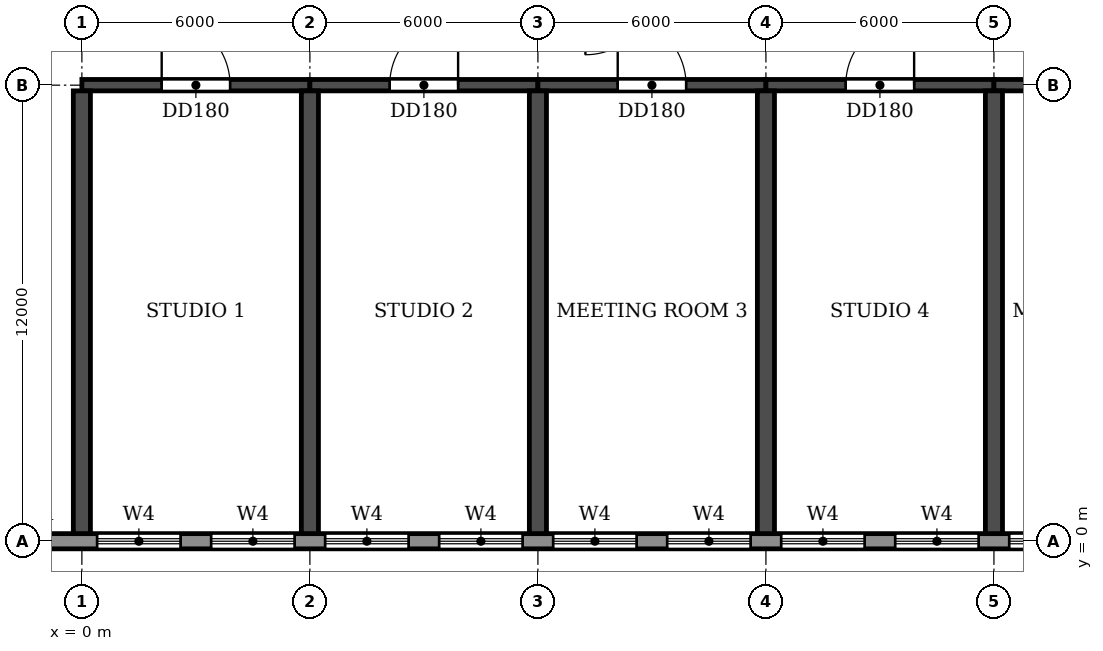
"""IFC4 building model, lengths in metres.
Left out: names, types, materials, properties, quantities, classifications, styles, units other than length and angle.
Written with IfcOpenShell. Run it as: python <this file> out.ifc"""

import sys

from ifc_helpers import new_model, si_unit, direction, frame, frame_2d, origin, place, context, subcontext, project, spatial, rectangle, extrude, element, fill, save


model = new_model("IFC4")
c1 = context("Model", 3, precision=1e-05, world=origin(), true_north=direction((0.0, 1.0)))
c2 = subcontext(c1, "Body", "Model", "MODEL_VIEW")
j1 = project(units=[si_unit("LENGTHUNIT", "METRE"), si_unit("PLANEANGLEUNIT", "RADIAN")], contexts=[c1])
p1 = place(None, origin())
s1 = spatial("IfcSite", under=j1, at=p1, CompositionType="ELEMENT")
p2 = place(p1, origin())
s2 = spatial("IfcBuilding", under=s1, at=p2, CompositionType="ELEMENT")
p3 = place(p2, frame((0.0, 0.0, 19.2)))
s3 = spatial("IfcBuildingStorey", under=s2, at=p3, CompositionType="ELEMENT", Elevation=19.2)
for number, where, z_axis, x_axis in (
    (1, (0.0, 0.2, 0.0), (0.0, 0.0, 1.0), (0.0, 1.0, 0.0)),
    (2, (6.0, 0.2, 0.0), (0.0, 0.0, 1.0), (0.0, 1.0, 0.0)),
    (3, (12.0, 0.2, 0.0), (0.0, 0.0, 1.0), (0.0, 1.0, 0.0)),
    (4, (18.0, 0.2, 0.0), (0.0, 0.0, 1.0), (0.0, 1.0, 0.0)),
    (5, (24.0, 0.2, 0.0), (0.0, 0.0, 1.0), (0.0, 1.0, 0.0)),
):
    element("IfcWall", number, at=place(p3, frame(where, z_axis=z_axis, x_axis=x_axis)), inside=s3, PredefinedType="SHEAR", context=c2, shape_type="SweptSolid", body=[
        extrude(rectangle(XDim=11.65, YDim=0.45, at=frame_2d((5.825, 0.0))), origin(), (0.0, 0.0, 1.0), 3.95),
    ])
p4 = place(p3, frame((0.0, 12.0, 0.0), z_axis=(0.0, 0.0, 1.0), x_axis=(1.0, 0.0, 0.0)))
e6 = element("IfcWall", 6, at=p4, inside=s3, PredefinedType="SHEAR", context=c2, shape_type="SweptSolid", body=[
    extrude(rectangle(XDim=6.0, YDim=0.3, at=frame_2d((3.0, 0.0))), origin(), (0.0, 0.0, 1.0), 3.35),
])
p5 = place(p4, frame((2.1, 0.0, 0.0)))
e7 = element("IfcOpeningElement", 7, at=p5, cuts=e6, PredefinedType="OPENING", context=c2, shape_type="SweptSolid", body=[
    extrude(rectangle(XDim=1.8, YDim=2.1, at=frame_2d((0.9, 1.05))), frame((0.0, 0.16, 0.0), z_axis=(0.0, -1.0, 0.0), x_axis=(1.0, 0.0, 0.0)), (0.0, 0.0, 1.0), 0.32),
])
p6 = place(p3, frame((6.0, 12.0, 0.0), z_axis=(0.0, 0.0, 1.0), x_axis=(1.0, 0.0, 0.0)))
e8 = element("IfcWall", 8, at=p6, inside=s3, PredefinedType="SHEAR", context=c2, shape_type="SweptSolid", body=[
    extrude(rectangle(XDim=6.0, YDim=0.3, at=frame_2d((3.0, 0.0))), origin(), (0.0, 0.0, 1.0), 3.35),
])
p7 = place(p6, frame((2.1, 0.0, 0.0)))
e9 = element("IfcOpeningElement", 9, at=p7, cuts=e8, PredefinedType="OPENING", context=c2, shape_type="SweptSolid", body=[
    extrude(rectangle(XDim=1.8, YDim=2.1, at=frame_2d((0.9, 1.05))), frame((0.0, 0.16, 0.0), z_axis=(0.0, -1.0, 0.0), x_axis=(1.0, 0.0, 0.0)), (0.0, 0.0, 1.0), 0.32),
])
p8 = place(p3, frame((12.0, 12.0, 0.0), z_axis=(0.0, 0.0, 1.0), x_axis=(1.0, 0.0, 0.0)))
e10 = element("IfcWall", 10, at=p8, inside=s3, PredefinedType="SHEAR", context=c2, shape_type="SweptSolid", body=[
    extrude(rectangle(XDim=6.0, YDim=0.3, at=frame_2d((3.0, 0.0))), origin(), (0.0, 0.0, 1.0), 3.35),
])
p9 = place(p8, frame((2.1, 0.0, 0.0)))
e11 = element("IfcOpeningElement", 11, at=p9, cuts=e10, PredefinedType="OPENING", context=c2, shape_type="SweptSolid", body=[
    extrude(rectangle(XDim=1.8, YDim=2.1, at=frame_2d((0.9, 1.05))), frame((0.0, 0.16, 0.0), z_axis=(0.0, -1.0, 0.0), x_axis=(1.0, 0.0, 0.0)), (0.0, 0.0, 1.0), 0.32),
])
p10 = place(p3, frame((18.0, 12.0, 0.0), z_axis=(0.0, 0.0, 1.0), x_axis=(1.0, 0.0, 0.0)))
e12 = element("IfcWall", 12, at=p10, inside=s3, PredefinedType="SHEAR", context=c2, shape_type="SweptSolid", body=[
    extrude(rectangle(XDim=6.0, YDim=0.3, at=frame_2d((3.0, 0.0))), origin(), (0.0, 0.0, 1.0), 3.35),
])
p11 = place(p10, frame((2.1, 0.0, 0.0)))
e13 = element("IfcOpeningElement", 13, at=p11, cuts=e12, PredefinedType="OPENING", context=c2, shape_type="SweptSolid", body=[
    extrude(rectangle(XDim=1.8, YDim=2.1, at=frame_2d((0.9, 1.05))), frame((0.0, 0.16, 0.0), z_axis=(0.0, -1.0, 0.0), x_axis=(1.0, 0.0, 0.0)), (0.0, 0.0, 1.0), 0.32),
])
p12 = place(p3, frame((24.0, 12.0, 0.0), z_axis=(0.0, 0.0, 1.0), x_axis=(1.0, 0.0, 0.0)))
e14 = element("IfcWall", 14, at=p12, inside=s3, PredefinedType="SHEAR", context=c2, shape_type="SweptSolid", body=[
    extrude(rectangle(XDim=6.0, YDim=0.3, at=frame_2d((3.0, 0.0))), origin(), (0.0, 0.0, 1.0), 3.35),
])
p13 = place(p12, frame((2.1, 0.0, 0.0)))
e15 = element("IfcOpeningElement", 15, at=p13, cuts=e14, PredefinedType="OPENING", context=c2, shape_type="SweptSolid", body=[
    extrude(rectangle(XDim=1.8, YDim=2.1, at=frame_2d((0.9, 1.05))), frame((0.0, 0.16, 0.0), z_axis=(0.0, -1.0, 0.0), x_axis=(1.0, 0.0, 0.0)), (0.0, 0.0, 1.0), 0.32),
])
p14 = place(p3, frame((-3.0, 0.0, 0.0), z_axis=(0.0, 0.0, 1.0), x_axis=(1.0, 0.0, 0.0)))
e16 = element("IfcWall", 16, at=p14, inside=s3, PredefinedType="STANDARD", context=c2, shape_type="SweptSolid", body=[
    extrude(rectangle(XDim=108.0, YDim=0.4, at=frame_2d((54.0, 0.0))), origin(), (0.0, 0.0, 1.0), 3.95),
])
p15 = place(p14, frame((3.4, 0.0, 0.9)))
e17 = element("IfcOpeningElement", 17, at=p15, cuts=e16, PredefinedType="OPENING", context=c2, shape_type="SweptSolid", body=[
    extrude(rectangle(XDim=2.2, YDim=2.7, at=frame_2d((1.1, 1.35))), frame((0.0, 0.21, 0.0), z_axis=(0.0, -1.0, 0.0), x_axis=(1.0, 0.0, 0.0)), (0.0, 0.0, 1.0), 0.42),
])
p16 = place(p14, frame((6.4, 0.0, 0.9)))
e18 = element("IfcOpeningElement", 18, at=p16, cuts=e16, PredefinedType="OPENING", context=c2, shape_type="SweptSolid", body=[
    extrude(rectangle(XDim=2.2, YDim=2.7, at=frame_2d((1.1, 1.35))), frame((0.0, 0.21, 0.0), z_axis=(0.0, -1.0, 0.0), x_axis=(1.0, 0.0, 0.0)), (0.0, 0.0, 1.0), 0.42),
])
p17 = place(p14, frame((9.4, 0.0, 0.9)))
e19 = element("IfcOpeningElement", 19, at=p17, cuts=e16, PredefinedType="OPENING", context=c2, shape_type="SweptSolid", body=[
    extrude(rectangle(XDim=2.2, YDim=2.7, at=frame_2d((1.1, 1.35))), frame((0.0, 0.21, 0.0), z_axis=(0.0, -1.0, 0.0), x_axis=(1.0, 0.0, 0.0)), (0.0, 0.0, 1.0), 0.42),
])
p18 = place(p14, frame((12.4, 0.0, 0.9)))
e20 = element("IfcOpeningElement", 20, at=p18, cuts=e16, PredefinedType="OPENING", context=c2, shape_type="SweptSolid", body=[
    extrude(rectangle(XDim=2.2, YDim=2.7, at=frame_2d((1.1, 1.35))), frame((0.0, 0.21, 0.0), z_axis=(0.0, -1.0, 0.0), x_axis=(1.0, 0.0, 0.0)), (0.0, 0.0, 1.0), 0.42),
])
p19 = place(p14, frame((15.4, 0.0, 0.9)))
e21 = element("IfcOpeningElement", 21, at=p19, cuts=e16, PredefinedType="OPENING", context=c2, shape_type="SweptSolid", body=[
    extrude(rectangle(XDim=2.2, YDim=2.7, at=frame_2d((1.1, 1.35))), frame((0.0, 0.21, 0.0), z_axis=(0.0, -1.0, 0.0), x_axis=(1.0, 0.0, 0.0)), (0.0, 0.0, 1.0), 0.42),
])
p20 = place(p14, frame((18.4, 0.0, 0.9)))
e22 = element("IfcOpeningElement", 22, at=p20, cuts=e16, PredefinedType="OPENING", context=c2, shape_type="SweptSolid", body=[
    extrude(rectangle(XDim=2.2, YDim=2.7, at=frame_2d((1.1, 1.35))), frame((0.0, 0.21, 0.0), z_axis=(0.0, -1.0, 0.0), x_axis=(1.0, 0.0, 0.0)), (0.0, 0.0, 1.0), 0.42),
])
p21 = place(p14, frame((21.4, 0.0, 0.9)))
e23 = element("IfcOpeningElement", 23, at=p21, cuts=e16, PredefinedType="OPENING", context=c2, shape_type="SweptSolid", body=[
    extrude(rectangle(XDim=2.2, YDim=2.7, at=frame_2d((1.1, 1.35))), frame((0.0, 0.21, 0.0), z_axis=(0.0, -1.0, 0.0), x_axis=(1.0, 0.0, 0.0)), (0.0, 0.0, 1.0), 0.42),
])
p22 = place(p14, frame((24.4, 0.0, 0.9)))
e24 = element("IfcOpeningElement", 24, at=p22, cuts=e16, PredefinedType="OPENING", context=c2, shape_type="SweptSolid", body=[
    extrude(rectangle(XDim=2.2, YDim=2.7, at=frame_2d((1.1, 1.35))), frame((0.0, 0.21, 0.0), z_axis=(0.0, -1.0, 0.0), x_axis=(1.0, 0.0, 0.0)), (0.0, 0.0, 1.0), 0.42),
])
p23 = place(p14, frame((27.4, 0.0, 0.9)))
e25 = element("IfcOpeningElement", 25, at=p23, cuts=e16, PredefinedType="OPENING", context=c2, shape_type="SweptSolid", body=[
    extrude(rectangle(XDim=2.2, YDim=2.7, at=frame_2d((1.1, 1.35))), frame((0.0, 0.21, 0.0), z_axis=(0.0, -1.0, 0.0), x_axis=(1.0, 0.0, 0.0)), (0.0, 0.0, 1.0), 0.42),
])
p24 = place(p14, frame((30.4, 0.0, 0.9)))
e26 = element("IfcOpeningElement", 26, at=p24, cuts=e16, PredefinedType="OPENING", context=c2, shape_type="SweptSolid", body=[
    extrude(rectangle(XDim=2.2, YDim=2.7, at=frame_2d((1.1, 1.35))), frame((0.0, 0.21, 0.0), z_axis=(0.0, -1.0, 0.0), x_axis=(1.0, 0.0, 0.0)), (0.0, 0.0, 1.0), 0.42),
])
p25 = place(p14, frame((33.4, 0.0, 0.9)))
e27 = element("IfcOpeningElement", 27, at=p25, cuts=e16, PredefinedType="OPENING", context=c2, shape_type="SweptSolid", body=[
    extrude(rectangle(XDim=2.2, YDim=2.7, at=frame_2d((1.1, 1.35))), frame((0.0, 0.21, 0.0), z_axis=(0.0, -1.0, 0.0), x_axis=(1.0, 0.0, 0.0)), (0.0, 0.0, 1.0), 0.42),
])
p26 = place(p14, frame((36.4, 0.0, 0.9)))
e28 = element("IfcOpeningElement", 28, at=p26, cuts=e16, PredefinedType="OPENING", context=c2, shape_type="SweptSolid", body=[
    extrude(rectangle(XDim=2.2, YDim=2.7, at=frame_2d((1.1, 1.35))), frame((0.0, 0.21, 0.0), z_axis=(0.0, -1.0, 0.0), x_axis=(1.0, 0.0, 0.0)), (0.0, 0.0, 1.0), 0.42),
])
p27 = place(p14, frame((39.4, 0.0, 0.9)))
e29 = element("IfcOpeningElement", 29, at=p27, cuts=e16, PredefinedType="OPENING", context=c2, shape_type="SweptSolid", body=[
    extrude(rectangle(XDim=2.2, YDim=2.7, at=frame_2d((1.1, 1.35))), frame((0.0, 0.21, 0.0), z_axis=(0.0, -1.0, 0.0), x_axis=(1.0, 0.0, 0.0)), (0.0, 0.0, 1.0), 0.42),
])
p28 = place(p14, frame((42.4, 0.0, 0.9)))
e30 = element("IfcOpeningElement", 30, at=p28, cuts=e16, PredefinedType="OPENING", context=c2, shape_type="SweptSolid", body=[
    extrude(rectangle(XDim=2.2, YDim=2.7, at=frame_2d((1.1, 1.35))), frame((0.0, 0.21, 0.0), z_axis=(0.0, -1.0, 0.0), x_axis=(1.0, 0.0, 0.0)), (0.0, 0.0, 1.0), 0.42),
])
p29 = place(p14, frame((45.4, 0.0, 0.9)))
e31 = element("IfcOpeningElement", 31, at=p29, cuts=e16, PredefinedType="OPENING", context=c2, shape_type="SweptSolid", body=[
    extrude(rectangle(XDim=2.2, YDim=2.7, at=frame_2d((1.1, 1.35))), frame((0.0, 0.21, 0.0), z_axis=(0.0, -1.0, 0.0), x_axis=(1.0, 0.0, 0.0)), (0.0, 0.0, 1.0), 0.42),
])
p30 = place(p14, frame((48.4, 0.0, 0.9)))
e32 = element("IfcOpeningElement", 32, at=p30, cuts=e16, PredefinedType="OPENING", context=c2, shape_type="SweptSolid", body=[
    extrude(rectangle(XDim=2.2, YDim=2.7, at=frame_2d((1.1, 1.35))), frame((0.0, 0.21, 0.0), z_axis=(0.0, -1.0, 0.0), x_axis=(1.0, 0.0, 0.0)), (0.0, 0.0, 1.0), 0.42),
])
p31 = place(p14, frame((51.4, 0.0, 0.9)))
e33 = element("IfcOpeningElement", 33, at=p31, cuts=e16, PredefinedType="OPENING", context=c2, shape_type="SweptSolid", body=[
    extrude(rectangle(XDim=2.2, YDim=2.7, at=frame_2d((1.1, 1.35))), frame((0.0, 0.21, 0.0), z_axis=(0.0, -1.0, 0.0), x_axis=(1.0, 0.0, 0.0)), (0.0, 0.0, 1.0), 0.42),
])
p32 = place(p14, frame((54.4, 0.0, 0.9)))
e34 = element("IfcOpeningElement", 34, at=p32, cuts=e16, PredefinedType="OPENING", context=c2, shape_type="SweptSolid", body=[
    extrude(rectangle(XDim=2.2, YDim=2.7, at=frame_2d((1.1, 1.35))), frame((0.0, 0.21, 0.0), z_axis=(0.0, -1.0, 0.0), x_axis=(1.0, 0.0, 0.0)), (0.0, 0.0, 1.0), 0.42),
])
p33 = place(p14, frame((57.4, 0.0, 0.9)))
e35 = element("IfcOpeningElement", 35, at=p33, cuts=e16, PredefinedType="OPENING", context=c2, shape_type="SweptSolid", body=[
    extrude(rectangle(XDim=2.2, YDim=2.7, at=frame_2d((1.1, 1.35))), frame((0.0, 0.21, 0.0), z_axis=(0.0, -1.0, 0.0), x_axis=(1.0, 0.0, 0.0)), (0.0, 0.0, 1.0), 0.42),
])
p34 = place(p14, frame((60.4, 0.0, 0.9)))
e36 = element("IfcOpeningElement", 36, at=p34, cuts=e16, PredefinedType="OPENING", context=c2, shape_type="SweptSolid", body=[
    extrude(rectangle(XDim=2.2, YDim=2.7, at=frame_2d((1.1, 1.35))), frame((0.0, 0.21, 0.0), z_axis=(0.0, -1.0, 0.0), x_axis=(1.0, 0.0, 0.0)), (0.0, 0.0, 1.0), 0.42),
])
p35 = place(p14, frame((63.4, 0.0, 0.9)))
e37 = element("IfcOpeningElement", 37, at=p35, cuts=e16, PredefinedType="OPENING", context=c2, shape_type="SweptSolid", body=[
    extrude(rectangle(XDim=2.2, YDim=2.7, at=frame_2d((1.1, 1.35))), frame((0.0, 0.21, 0.0), z_axis=(0.0, -1.0, 0.0), x_axis=(1.0, 0.0, 0.0)), (0.0, 0.0, 1.0), 0.42),
])
p36 = place(p14, frame((66.4, 0.0, 0.9)))
e38 = element("IfcOpeningElement", 38, at=p36, cuts=e16, PredefinedType="OPENING", context=c2, shape_type="SweptSolid", body=[
    extrude(rectangle(XDim=2.2, YDim=2.7, at=frame_2d((1.1, 1.35))), frame((0.0, 0.21, 0.0), z_axis=(0.0, -1.0, 0.0), x_axis=(1.0, 0.0, 0.0)), (0.0, 0.0, 1.0), 0.42),
])
p37 = place(p14, frame((69.4, 0.0, 0.9)))
e39 = element("IfcOpeningElement", 39, at=p37, cuts=e16, PredefinedType="OPENING", context=c2, shape_type="SweptSolid", body=[
    extrude(rectangle(XDim=2.2, YDim=2.7, at=frame_2d((1.1, 1.35))), frame((0.0, 0.21, 0.0), z_axis=(0.0, -1.0, 0.0), x_axis=(1.0, 0.0, 0.0)), (0.0, 0.0, 1.0), 0.42),
])
p38 = place(p14, frame((72.4, 0.0, 0.9)))
e40 = element("IfcOpeningElement", 40, at=p38, cuts=e16, PredefinedType="OPENING", context=c2, shape_type="SweptSolid", body=[
    extrude(rectangle(XDim=2.2, YDim=2.7, at=frame_2d((1.1, 1.35))), frame((0.0, 0.21, 0.0), z_axis=(0.0, -1.0, 0.0), x_axis=(1.0, 0.0, 0.0)), (0.0, 0.0, 1.0), 0.42),
])
p39 = place(p14, frame((75.4, 0.0, 0.9)))
e41 = element("IfcOpeningElement", 41, at=p39, cuts=e16, PredefinedType="OPENING", context=c2, shape_type="SweptSolid", body=[
    extrude(rectangle(XDim=2.2, YDim=2.7, at=frame_2d((1.1, 1.35))), frame((0.0, 0.21, 0.0), z_axis=(0.0, -1.0, 0.0), x_axis=(1.0, 0.0, 0.0)), (0.0, 0.0, 1.0), 0.42),
])
p40 = place(p14, frame((78.4, 0.0, 0.9)))
e42 = element("IfcOpeningElement", 42, at=p40, cuts=e16, PredefinedType="OPENING", context=c2, shape_type="SweptSolid", body=[
    extrude(rectangle(XDim=2.2, YDim=2.7, at=frame_2d((1.1, 1.35))), frame((0.0, 0.21, 0.0), z_axis=(0.0, -1.0, 0.0), x_axis=(1.0, 0.0, 0.0)), (0.0, 0.0, 1.0), 0.42),
])
p41 = place(p14, frame((81.4, 0.0, 0.9)))
e43 = element("IfcOpeningElement", 43, at=p41, cuts=e16, PredefinedType="OPENING", context=c2, shape_type="SweptSolid", body=[
    extrude(rectangle(XDim=2.2, YDim=2.7, at=frame_2d((1.1, 1.35))), frame((0.0, 0.21, 0.0), z_axis=(0.0, -1.0, 0.0), x_axis=(1.0, 0.0, 0.0)), (0.0, 0.0, 1.0), 0.42),
])
p42 = place(p14, frame((84.4, 0.0, 0.9)))
e44 = element("IfcOpeningElement", 44, at=p42, cuts=e16, PredefinedType="OPENING", context=c2, shape_type="SweptSolid", body=[
    extrude(rectangle(XDim=2.2, YDim=2.7, at=frame_2d((1.1, 1.35))), frame((0.0, 0.21, 0.0), z_axis=(0.0, -1.0, 0.0), x_axis=(1.0, 0.0, 0.0)), (0.0, 0.0, 1.0), 0.42),
])
p43 = place(p14, frame((87.4, 0.0, 0.9)))
e45 = element("IfcOpeningElement", 45, at=p43, cuts=e16, PredefinedType="OPENING", context=c2, shape_type="SweptSolid", body=[
    extrude(rectangle(XDim=2.2, YDim=2.7, at=frame_2d((1.1, 1.35))), frame((0.0, 0.21, 0.0), z_axis=(0.0, -1.0, 0.0), x_axis=(1.0, 0.0, 0.0)), (0.0, 0.0, 1.0), 0.42),
])
p44 = place(p14, frame((90.4, 0.0, 0.9)))
e46 = element("IfcOpeningElement", 46, at=p44, cuts=e16, PredefinedType="OPENING", context=c2, shape_type="SweptSolid", body=[
    extrude(rectangle(XDim=2.2, YDim=2.7, at=frame_2d((1.1, 1.35))), frame((0.0, 0.21, 0.0), z_axis=(0.0, -1.0, 0.0), x_axis=(1.0, 0.0, 0.0)), (0.0, 0.0, 1.0), 0.42),
])
p45 = place(p14, frame((93.4, 0.0, 0.9)))
e47 = element("IfcOpeningElement", 47, at=p45, cuts=e16, PredefinedType="OPENING", context=c2, shape_type="SweptSolid", body=[
    extrude(rectangle(XDim=2.2, YDim=2.7, at=frame_2d((1.1, 1.35))), frame((0.0, 0.21, 0.0), z_axis=(0.0, -1.0, 0.0), x_axis=(1.0, 0.0, 0.0)), (0.0, 0.0, 1.0), 0.42),
])
p46 = place(p14, frame((96.4, 0.0, 0.9)))
e48 = element("IfcOpeningElement", 48, at=p46, cuts=e16, PredefinedType="OPENING", context=c2, shape_type="SweptSolid", body=[
    extrude(rectangle(XDim=2.2, YDim=2.7, at=frame_2d((1.1, 1.35))), frame((0.0, 0.21, 0.0), z_axis=(0.0, -1.0, 0.0), x_axis=(1.0, 0.0, 0.0)), (0.0, 0.0, 1.0), 0.42),
])
p47 = place(p14, frame((99.4, 0.0, 0.9)))
e49 = element("IfcOpeningElement", 49, at=p47, cuts=e16, PredefinedType="OPENING", context=c2, shape_type="SweptSolid", body=[
    extrude(rectangle(XDim=2.2, YDim=2.7, at=frame_2d((1.1, 1.35))), frame((0.0, 0.21, 0.0), z_axis=(0.0, -1.0, 0.0), x_axis=(1.0, 0.0, 0.0)), (0.0, 0.0, 1.0), 0.42),
])
p48 = place(p14, frame((102.4, 0.0, 0.9)))
e50 = element("IfcOpeningElement", 50, at=p48, cuts=e16, PredefinedType="OPENING", context=c2, shape_type="SweptSolid", body=[
    extrude(rectangle(XDim=2.2, YDim=2.7, at=frame_2d((1.1, 1.35))), frame((0.0, 0.21, 0.0), z_axis=(0.0, -1.0, 0.0), x_axis=(1.0, 0.0, 0.0)), (0.0, 0.0, 1.0), 0.42),
])
p49 = place(p15, origin())
e51 = element("IfcWindow", 51, at=p49, inside=s3, PartitioningType="DOUBLE_PANEL_HORIZONTAL", PredefinedType="WINDOW", context=c2, shape_type="SweptSolid", body=[
    extrude(rectangle(XDim=2.2, YDim=2.7, at=frame_2d((1.1, 1.35))), frame((0.0, 0.03, 0.0), z_axis=(0.0, -1.0, 0.0), x_axis=(1.0, 0.0, 0.0)), (0.0, 0.0, 1.0), 0.06),
])
fill(e17, e51)
p50 = place(p16, origin())
e52 = element("IfcWindow", 52, at=p50, inside=s3, PartitioningType="DOUBLE_PANEL_HORIZONTAL", PredefinedType="WINDOW", context=c2, shape_type="SweptSolid", body=[
    extrude(rectangle(XDim=2.2, YDim=2.7, at=frame_2d((1.1, 1.35))), frame((0.0, 0.03, 0.0), z_axis=(0.0, -1.0, 0.0), x_axis=(1.0, 0.0, 0.0)), (0.0, 0.0, 1.0), 0.06),
])
fill(e18, e52)
p51 = place(p17, origin())
e53 = element("IfcWindow", 53, at=p51, inside=s3, PartitioningType="DOUBLE_PANEL_HORIZONTAL", PredefinedType="WINDOW", context=c2, shape_type="SweptSolid", body=[
    extrude(rectangle(XDim=2.2, YDim=2.7, at=frame_2d((1.1, 1.35))), frame((0.0, 0.03, 0.0), z_axis=(0.0, -1.0, 0.0), x_axis=(1.0, 0.0, 0.0)), (0.0, 0.0, 1.0), 0.06),
])
fill(e19, e53)
p52 = place(p18, origin())
e54 = element("IfcWindow", 54, at=p52, inside=s3, PartitioningType="DOUBLE_PANEL_HORIZONTAL", PredefinedType="WINDOW", context=c2, shape_type="SweptSolid", body=[
    extrude(rectangle(XDim=2.2, YDim=2.7, at=frame_2d((1.1, 1.35))), frame((0.0, 0.03, 0.0), z_axis=(0.0, -1.0, 0.0), x_axis=(1.0, 0.0, 0.0)), (0.0, 0.0, 1.0), 0.06),
])
fill(e20, e54)
p53 = place(p19, origin())
e55 = element("IfcWindow", 55, at=p53, inside=s3, PartitioningType="DOUBLE_PANEL_HORIZONTAL", PredefinedType="WINDOW", context=c2, shape_type="SweptSolid", body=[
    extrude(rectangle(XDim=2.2, YDim=2.7, at=frame_2d((1.1, 1.35))), frame((0.0, 0.03, 0.0), z_axis=(0.0, -1.0, 0.0), x_axis=(1.0, 0.0, 0.0)), (0.0, 0.0, 1.0), 0.06),
])
fill(e21, e55)
p54 = place(p20, origin())
e56 = element("IfcWindow", 56, at=p54, inside=s3, PartitioningType="DOUBLE_PANEL_HORIZONTAL", PredefinedType="WINDOW", context=c2, shape_type="SweptSolid", body=[
    extrude(rectangle(XDim=2.2, YDim=2.7, at=frame_2d((1.1, 1.35))), frame((0.0, 0.03, 0.0), z_axis=(0.0, -1.0, 0.0), x_axis=(1.0, 0.0, 0.0)), (0.0, 0.0, 1.0), 0.06),
])
fill(e22, e56)
p55 = place(p21, origin())
e57 = element("IfcWindow", 57, at=p55, inside=s3, PartitioningType="DOUBLE_PANEL_HORIZONTAL", PredefinedType="WINDOW", context=c2, shape_type="SweptSolid", body=[
    extrude(rectangle(XDim=2.2, YDim=2.7, at=frame_2d((1.1, 1.35))), frame((0.0, 0.03, 0.0), z_axis=(0.0, -1.0, 0.0), x_axis=(1.0, 0.0, 0.0)), (0.0, 0.0, 1.0), 0.06),
])
fill(e23, e57)
p56 = place(p22, origin())
e58 = element("IfcWindow", 58, at=p56, inside=s3, PartitioningType="DOUBLE_PANEL_HORIZONTAL", PredefinedType="WINDOW", context=c2, shape_type="SweptSolid", body=[
    extrude(rectangle(XDim=2.2, YDim=2.7, at=frame_2d((1.1, 1.35))), frame((0.0, 0.03, 0.0), z_axis=(0.0, -1.0, 0.0), x_axis=(1.0, 0.0, 0.0)), (0.0, 0.0, 1.0), 0.06),
])
fill(e24, e58)
p57 = place(p23, origin())
e59 = element("IfcWindow", 59, at=p57, inside=s3, PartitioningType="DOUBLE_PANEL_HORIZONTAL", PredefinedType="WINDOW", context=c2, shape_type="SweptSolid", body=[
    extrude(rectangle(XDim=2.2, YDim=2.7, at=frame_2d((1.1, 1.35))), frame((0.0, 0.03, 0.0), z_axis=(0.0, -1.0, 0.0), x_axis=(1.0, 0.0, 0.0)), (0.0, 0.0, 1.0), 0.06),
])
fill(e25, e59)
p58 = place(p5, origin())
e60 = element("IfcDoor", 60, at=p58, inside=s3, OperationType="DOUBLE_DOOR_SINGLE_SWING", PredefinedType="DOOR", context=c2, shape_type="SweptSolid", body=[
    extrude(rectangle(XDim=1.8, YDim=2.1, at=frame_2d((0.9, 1.05))), frame((0.0, 0.025, 0.0), z_axis=(0.0, -1.0, 0.0), x_axis=(1.0, 0.0, 0.0)), (0.0, 0.0, 1.0), 0.05),
])
fill(e7, e60)
p59 = place(p7, origin())
e61 = element("IfcDoor", 61, at=p59, inside=s3, OperationType="DOUBLE_DOOR_SINGLE_SWING", PredefinedType="DOOR", context=c2, shape_type="SweptSolid", body=[
    extrude(rectangle(XDim=1.8, YDim=2.1, at=frame_2d((0.9, 1.05))), frame((0.0, 0.025, 0.0), z_axis=(0.0, -1.0, 0.0), x_axis=(1.0, 0.0, 0.0)), (0.0, 0.0, 1.0), 0.05),
])
fill(e9, e61)
p60 = place(p9, origin())
e62 = element("IfcDoor", 62, at=p60, inside=s3, OperationType="DOUBLE_DOOR_SINGLE_SWING", PredefinedType="DOOR", context=c2, shape_type="SweptSolid", body=[
    extrude(rectangle(XDim=1.8, YDim=2.1, at=frame_2d((0.9, 1.05))), frame((0.0, 0.025, 0.0), z_axis=(0.0, -1.0, 0.0), x_axis=(1.0, 0.0, 0.0)), (0.0, 0.0, 1.0), 0.05),
])
fill(e11, e62)
p61 = place(p11, origin())
e63 = element("IfcDoor", 63, at=p61, inside=s3, OperationType="DOUBLE_DOOR_SINGLE_SWING", PredefinedType="DOOR", context=c2, shape_type="SweptSolid", body=[
    extrude(rectangle(XDim=1.8, YDim=2.1, at=frame_2d((0.9, 1.05))), frame((0.0, 0.025, 0.0), z_axis=(0.0, -1.0, 0.0), x_axis=(1.0, 0.0, 0.0)), (0.0, 0.0, 1.0), 0.05),
])
fill(e13, e63)
save(model, sys.argv[1])
